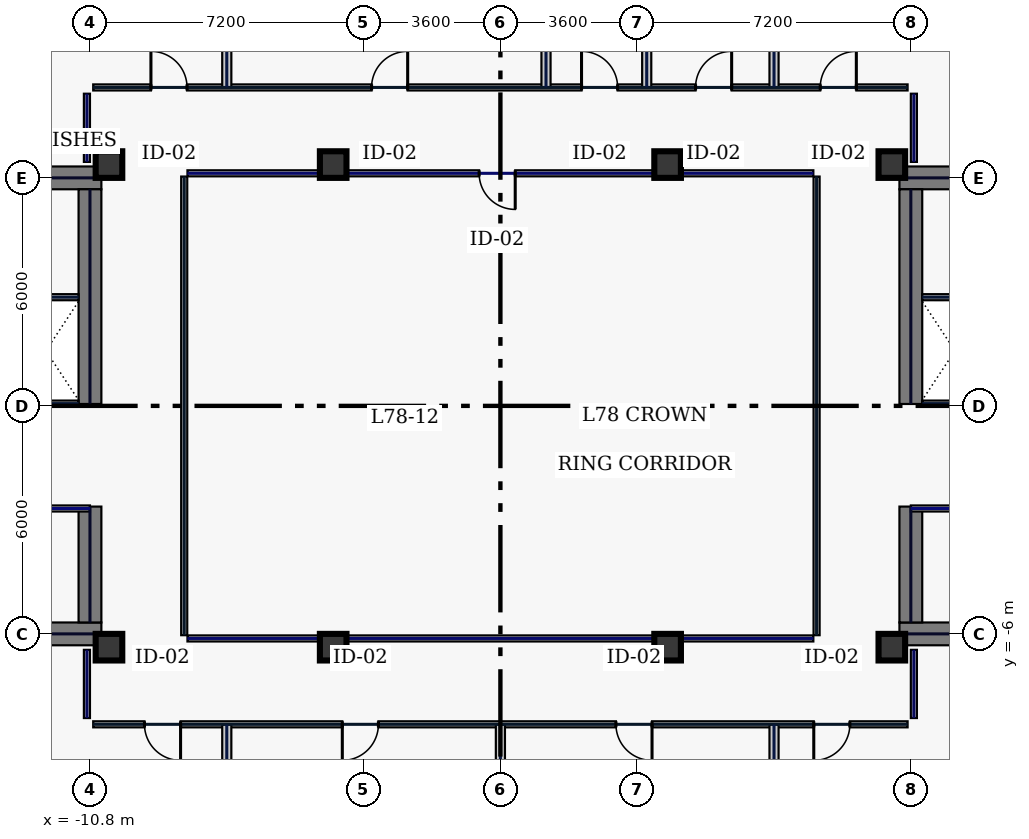
"""IFC4 building model, lengths in metres.
Left out: names, types, materials, properties, quantities, classifications, styles, units other than length and angle.
Written with IfcOpenShell. Run it as: python <this file> out.ifc"""

import sys

from ifc_helpers import new_model, si_unit, direction, frame, frame_2d, origin, origin_2d, place, context, subcontext, project, spatial, rectangle, hollow_rectangle, extrude, element, fill, save


model = new_model("IFC4")
c1 = context("Model", 3, precision=1e-05, world=origin(), true_north=direction((0.0, 1.0)))
c2 = subcontext(c1, "Body", "Model", "MODEL_VIEW")
j1 = project(units=[si_unit("LENGTHUNIT", "METRE"), si_unit("PLANEANGLEUNIT", "RADIAN")], contexts=[c1])
p1 = place(None, origin())
s1 = spatial("IfcSite", under=j1, at=p1, CompositionType="ELEMENT")
p2 = place(p1, origin())
s2 = spatial("IfcBuilding", under=s1, at=p2, CompositionType="ELEMENT")
p3 = place(p2, frame((0.0, 0.0, 333.0)))
s3 = spatial("IfcBuildingStorey", under=s2, at=p3, CompositionType="ELEMENT", Elevation=333.0)
for number, where, z_axis, x_axis in (
    (1, (-22.0, 6.0, 0.0), (0.0, 0.0, 1.0), (1.0, 0.0, 0.0)),
    (2, (-22.0, -6.0, 0.0), (0.0, 0.0, 1.0), (1.0, 0.0, 0.0)),
):
    element("IfcWall", number, at=place(p3, frame(where, z_axis=z_axis, x_axis=x_axis)), inside=s3, PredefinedType="SHEAR", context=c2, shape_type="SweptSolid", body=[
        extrude(rectangle(XDim=11.5, YDim=0.6, at=frame_2d((5.75, 0.0))), origin(), (0.0, 0.0, 1.0), 6.5),
    ])
p4 = place(p3, frame((-10.8, -5.7, 0.0), z_axis=(0.0, 0.0, 1.0), x_axis=(0.0, 1.0, 0.0)))
e3 = element("IfcWall", 3, at=p4, inside=s3, PredefinedType="SHEAR", context=c2, shape_type="SweptSolid", body=[
    extrude(rectangle(XDim=3.05, YDim=0.6, at=frame_2d((1.525, 0.0))), origin(), (0.0, 0.0, 1.0), 6.5),
])
p5 = place(p3, frame((-10.8, 0.05, 0.0), z_axis=(0.0, 0.0, 1.0), x_axis=(0.0, 1.0, 0.0)))
e4 = element("IfcWall", 4, at=p5, inside=s3, PredefinedType="SHEAR", context=c2, shape_type="SweptSolid", body=[
    extrude(rectangle(XDim=5.65, YDim=0.6, at=frame_2d((2.825, 0.0))), origin(), (0.0, 0.0, 1.0), 6.5),
])
for number, where, z_axis, x_axis in (
    (5, (10.5, 6.0, 0.0), (0.0, 0.0, 1.0), (1.0, 0.0, 0.0)),
    (6, (10.5, -6.0, 0.0), (0.0, 0.0, 1.0), (1.0, 0.0, 0.0)),
):
    element("IfcWall", number, at=place(p3, frame(where, z_axis=z_axis, x_axis=x_axis)), inside=s3, PredefinedType="SHEAR", context=c2, shape_type="SweptSolid", body=[
        extrude(rectangle(XDim=11.5, YDim=0.6, at=frame_2d((5.75, 0.0))), origin(), (0.0, 0.0, 1.0), 6.5),
    ])
p6 = place(p3, frame((10.8, -5.7, 0.0), z_axis=(0.0, 0.0, 1.0), x_axis=(0.0, 1.0, 0.0)))
e7 = element("IfcWall", 7, at=p6, inside=s3, PredefinedType="SHEAR", context=c2, shape_type="SweptSolid", body=[
    extrude(rectangle(XDim=3.05, YDim=0.6, at=frame_2d((1.525, 0.0))), origin(), (0.0, 0.0, 1.0), 6.5),
])
p7 = place(p3, frame((10.8, 0.05, 0.0), z_axis=(0.0, 0.0, 1.0), x_axis=(0.0, 1.0, 0.0)))
e8 = element("IfcWall", 8, at=p7, inside=s3, PredefinedType="SHEAR", context=c2, shape_type="SweptSolid", body=[
    extrude(rectangle(XDim=5.65, YDim=0.6, at=frame_2d((2.825, 0.0))), origin(), (0.0, 0.0, 1.0), 6.5),
])
for number, where, z_axis, x_axis in (
    (9, (-10.3, -6.35, 0.0), (0.0, 0.0, 1.0), (1.0, 0.0, 0.0)),
    (10, (-10.3, 6.35, 0.0), (0.0, 0.0, 1.0), (1.0, 0.0, 0.0)),
    (11, (10.3, -6.35, 0.0), (0.0, 0.0, 1.0), (1.0, 0.0, 0.0)),
    (12, (10.3, 6.35, 0.0), (0.0, 0.0, 1.0), (1.0, 0.0, 0.0)),
    (13, (-4.4, -6.35, 0.0), (0.0, 0.0, 1.0), (1.0, 0.0, 0.0)),
    (14, (4.4, -6.35, 0.0), (0.0, 0.0, 1.0), (1.0, 0.0, 0.0)),
    (15, (-4.4, 6.35, 0.0), (0.0, 0.0, 1.0), (1.0, 0.0, 0.0)),
    (16, (4.4, 6.35, 0.0), (0.0, 0.0, 1.0), (1.0, 0.0, 0.0)),
):
    element("IfcColumn", number, at=place(p3, frame(where, z_axis=z_axis, x_axis=x_axis)), inside=s3, PredefinedType="COLUMN", context=c2, shape_type="SweptSolid", body=[
        extrude(hollow_rectangle(XDim=0.7, YDim=0.7, WallThickness=0.032, at=origin_2d()), origin(), (0.0, 0.0, 1.0), 6.5),
    ])
for number, where, z_axis, x_axis in (
    (17, (-12.82, 0.06, 0.0), (0.0, 0.0, 1.0), (1.0, 0.0, 0.0)),
    (18, (-12.82, 2.86, 0.0), (0.0, 0.0, 1.0), (1.0, 0.0, 0.0)),
    (19, (11.1, 0.06, 0.0), (0.0, 0.0, 1.0), (1.0, 0.0, 0.0)),
    (20, (11.1, 2.86, 0.0), (0.0, 0.0, 1.0), (1.0, 0.0, 0.0)),
):
    element("IfcWall", number, at=place(p3, frame(where, z_axis=z_axis, x_axis=x_axis)), inside=s3, PredefinedType="PARTITIONING", context=c2, shape_type="SweptSolid", body=[
        extrude(rectangle(XDim=1.72, YDim=0.16, at=frame_2d((0.86, 0.0))), origin(), (0.0, 0.0, 1.0), 6.5),
    ])
for number, where, z_axis, x_axis in (
    (21, (-14.535, -2.7, 0.0), (0.0, 0.0, 1.0), (1.0, 0.0, 0.0)),
    (22, (10.8, -2.7, 0.0), (0.0, 0.0, 1.0), (1.0, 0.0, 0.0)),
):
    element("IfcWall", number, at=place(p3, frame(where, z_axis=z_axis, x_axis=x_axis)), inside=s3, PredefinedType="PARTITIONING", context=c2, shape_type="SweptSolid", body=[
        extrude(rectangle(XDim=3.735, YDim=0.16, at=frame_2d((1.867, 0.0))), origin(), (0.0, 0.0, 1.0), 6.5),
    ])
for number, where, z_axis, x_axis in (
    (23, (-10.88, -8.215, 0.0), (0.0, 0.0, 1.0), (0.0, 1.0, 0.0)),
    (24, (-10.88, 6.42, 0.0), (0.0, 0.0, 1.0), (0.0, 1.0, 0.0)),
):
    element("IfcWall", number, at=place(p3, frame(where, z_axis=z_axis, x_axis=x_axis)), inside=s3, PredefinedType="PARTITIONING", context=c2, shape_type="SweptSolid", body=[
        extrude(rectangle(XDim=1.795, YDim=0.16, at=frame_2d((0.897, 0.0))), origin(), (0.0, 0.0, 1.0), 4.895),
    ])
p8 = place(p3, frame((-10.715, 8.38, 0.0), z_axis=(0.0, 0.0, 1.0), x_axis=(1.0, 0.0, 0.0)))
e25 = element("IfcWall", 25, at=p8, inside=s3, PredefinedType="PARTITIONING", context=c2, shape_type="SweptSolid", body=[
    extrude(rectangle(XDim=21.43, YDim=0.16, at=frame_2d((10.715, 0.0))), origin(), (0.0, 0.0, 1.0), 6.5),
])
p9 = place(p8, frame((7.325, 0.0, 0.0)))
e26 = element("IfcOpeningElement", 26, at=p9, cuts=e25, PredefinedType="OPENING", context=c2, shape_type="SweptSolid", body=[
    extrude(rectangle(XDim=0.95, YDim=2.2, at=frame_2d((0.475, 1.1))), frame((0.0, 0.09, 0.0), z_axis=(0.0, -1.0, 0.0), x_axis=(1.0, 0.0, 0.0)), (0.0, 0.0, 1.0), 0.18),
])
p10 = place(p8, frame((12.85, 0.0, 0.0)))
e27 = element("IfcOpeningElement", 27, at=p10, cuts=e25, PredefinedType="OPENING", context=c2, shape_type="SweptSolid", body=[
    extrude(rectangle(XDim=0.95, YDim=2.2, at=frame_2d((0.475, 1.1))), frame((0.0, 0.09, 0.0), z_axis=(0.0, -1.0, 0.0), x_axis=(1.0, 0.0, 0.0)), (0.0, 0.0, 1.0), 0.18),
])
p11 = place(p8, frame((15.85, 0.0, 0.0)))
e28 = element("IfcOpeningElement", 28, at=p11, cuts=e25, PredefinedType="OPENING", context=c2, shape_type="SweptSolid", body=[
    extrude(rectangle(XDim=0.95, YDim=2.2, at=frame_2d((0.475, 1.1))), frame((0.0, 0.09, 0.0), z_axis=(0.0, -1.0, 0.0), x_axis=(1.0, 0.0, 0.0)), (0.0, 0.0, 1.0), 0.18),
])
p12 = place(p8, frame((1.519, 0.0, 0.0)))
e29 = element("IfcOpeningElement", 29, at=p12, cuts=e25, PredefinedType="OPENING", context=c2, shape_type="SweptSolid", body=[
    extrude(rectangle(XDim=0.95, YDim=2.2, at=frame_2d((0.475, 1.1))), frame((0.0, 0.09, 0.0), z_axis=(0.0, -1.0, 0.0), x_axis=(1.0, 0.0, 0.0)), (0.0, 0.0, 1.0), 0.18),
])
p13 = place(p8, frame((19.131, 0.0, 0.0)))
e30 = element("IfcOpeningElement", 30, at=p13, cuts=e25, PredefinedType="OPENING", context=c2, shape_type="SweptSolid", body=[
    extrude(rectangle(XDim=0.95, YDim=2.2, at=frame_2d((0.475, 1.1))), frame((0.0, 0.09, 0.0), z_axis=(0.0, -1.0, 0.0), x_axis=(1.0, 0.0, 0.0)), (0.0, 0.0, 1.0), 0.18),
])
for number, where, z_axis, x_axis in (
    (31, (10.88, 8.215, 0.0), (0.0, 0.0, 1.0), (0.0, -1.0, 0.0)),
    (32, (10.88, -6.42, 0.0), (0.0, 0.0, 1.0), (0.0, -1.0, 0.0)),
):
    element("IfcWall", number, at=place(p3, frame(where, z_axis=z_axis, x_axis=x_axis)), inside=s3, PredefinedType="PARTITIONING", context=c2, shape_type="SweptSolid", body=[
        extrude(rectangle(XDim=1.795, YDim=0.16, at=frame_2d((0.897, 0.0))), origin(), (0.0, 0.0, 1.0), 4.895),
    ])
p14 = place(p3, frame((10.715, -8.38, 0.0), z_axis=(0.0, 0.0, 1.0), x_axis=(-1.0, 0.0, 0.0)))
e33 = element("IfcWall", 33, at=p14, inside=s3, PredefinedType="PARTITIONING", context=c2, shape_type="SweptSolid", body=[
    extrude(rectangle(XDim=21.43, YDim=0.16, at=frame_2d((10.715, 0.0))), origin(), (0.0, 0.0, 1.0), 6.5),
])
p15 = place(p14, frame((13.925, 0.0, 0.0)))
e34 = element("IfcOpeningElement", 34, at=p15, cuts=e33, PredefinedType="OPENING", context=c2, shape_type="SweptSolid", body=[
    extrude(rectangle(XDim=0.95, YDim=2.2, at=frame_2d((0.475, 1.1))), frame((0.0, 0.09, 0.0), z_axis=(0.0, -1.0, 0.0), x_axis=(1.0, 0.0, 0.0)), (0.0, 0.0, 1.0), 0.18),
])
p16 = place(p14, frame((6.725, 0.0, 0.0)))
e35 = element("IfcOpeningElement", 35, at=p16, cuts=e33, PredefinedType="OPENING", context=c2, shape_type="SweptSolid", body=[
    extrude(rectangle(XDim=0.95, YDim=2.2, at=frame_2d((0.475, 1.1))), frame((0.0, 0.09, 0.0), z_axis=(0.0, -1.0, 0.0), x_axis=(1.0, 0.0, 0.0)), (0.0, 0.0, 1.0), 0.18),
])
p17 = place(p14, frame((19.131, 0.0, 0.0)))
e36 = element("IfcOpeningElement", 36, at=p17, cuts=e33, PredefinedType="OPENING", context=c2, shape_type="SweptSolid", body=[
    extrude(rectangle(XDim=0.95, YDim=2.2, at=frame_2d((0.475, 1.1))), frame((0.0, 0.09, 0.0), z_axis=(0.0, -1.0, 0.0), x_axis=(1.0, 0.0, 0.0)), (0.0, 0.0, 1.0), 0.18),
])
p18 = place(p14, frame((1.519, 0.0, 0.0)))
e37 = element("IfcOpeningElement", 37, at=p18, cuts=e33, PredefinedType="OPENING", context=c2, shape_type="SweptSolid", body=[
    extrude(rectangle(XDim=0.95, YDim=2.2, at=frame_2d((0.475, 1.1))), frame((0.0, 0.09, 0.0), z_axis=(0.0, -1.0, 0.0), x_axis=(1.0, 0.0, 0.0)), (0.0, 0.0, 1.0), 0.18),
])
p19 = place(p3, frame((8.32, -6.035, 0.0), z_axis=(0.0, 0.0, 1.0), x_axis=(0.0, 1.0, 0.0)))
e38 = element("IfcWall", 38, at=p19, inside=s3, PredefinedType="PARTITIONING", context=c2, shape_type="SweptSolid", body=[
    extrude(rectangle(XDim=12.07, YDim=0.16, at=frame_2d((6.035, 0.0))), origin(), (0.0, 0.0, 1.0), 6.5),
])
p20 = place(p3, frame((8.235, 6.12, 0.0), z_axis=(0.0, 0.0, 1.0), x_axis=(-1.0, 0.0, 0.0)))
e39 = element("IfcWall", 39, at=p20, inside=s3, PredefinedType="PARTITIONING", context=c2, shape_type="SweptSolid", body=[
    extrude(rectangle(XDim=16.47, YDim=0.16, at=frame_2d((8.235, 0.0))), origin(), (0.0, 0.0, 1.0), 5.795),
])
p21 = place(p20, frame((7.845, 0.0, 0.0)))
e40 = element("IfcOpeningElement", 40, at=p21, cuts=e39, PredefinedType="OPENING", context=c2, shape_type="SweptSolid", body=[
    extrude(rectangle(XDim=0.95, YDim=2.2, at=frame_2d((0.475, 1.1))), frame((0.0, 0.09, 0.0), z_axis=(0.0, -1.0, 0.0), x_axis=(1.0, 0.0, 0.0)), (0.0, 0.0, 1.0), 0.18),
])
p22 = place(p3, frame((-8.32, 6.035, 0.0), z_axis=(0.0, 0.0, 1.0), x_axis=(0.0, -1.0, 0.0)))
e41 = element("IfcWall", 41, at=p22, inside=s3, PredefinedType="PARTITIONING", context=c2, shape_type="SweptSolid", body=[
    extrude(rectangle(XDim=12.07, YDim=0.16, at=frame_2d((6.035, 0.0))), origin(), (0.0, 0.0, 1.0), 6.5),
])
p23 = place(p3, frame((-8.235, -6.12, 0.0), z_axis=(0.0, 0.0, 1.0), x_axis=(1.0, 0.0, 0.0)))
e42 = element("IfcWall", 42, at=p23, inside=s3, PredefinedType="PARTITIONING", context=c2, shape_type="SweptSolid", body=[
    extrude(rectangle(XDim=16.47, YDim=0.16, at=frame_2d((8.235, 0.0))), origin(), (0.0, 0.0, 1.0), 5.795),
])
for number, where, z_axis, x_axis in (
    (43, (-7.2, -18.24, 0.0), (0.0, 0.0, 1.0), (0.0, 1.0, 0.0)),
    (44, (7.2, -18.24, 0.0), (0.0, 0.0, 1.0), (0.0, 1.0, 0.0)),
    (45, (-7.2, 8.385, 0.0), (0.0, 0.0, 1.0), (0.0, 1.0, 0.0)),
    (46, (7.2, 8.385, 0.0), (0.0, 0.0, 1.0), (0.0, 1.0, 0.0)),
    (47, (0.0, -18.24, 0.0), (0.0, 0.0, 1.0), (0.0, 1.0, 0.0)),
    (48, (1.2, 8.385, 0.0), (0.0, 0.0, 1.0), (0.0, 1.0, 0.0)),
    (49, (3.85, 8.385, 0.0), (0.0, 0.0, 1.0), (0.0, 1.0, 0.0)),
):
    element("IfcWall", number, at=place(p3, frame(where, z_axis=z_axis, x_axis=x_axis)), inside=s3, PredefinedType="PARTITIONING", context=c2, shape_type="SweptSolid", body=[
        extrude(rectangle(XDim=9.855, YDim=0.24, at=frame_2d((4.927, 0.0))), origin(), (0.0, 0.0, 1.0), 6.5),
    ])
p24 = place(p21, origin())
e50 = element("IfcDoor", 50, at=p24, inside=s3, OperationType="SINGLE_SWING_LEFT", PredefinedType="DOOR", context=c2, shape_type="SweptSolid", body=[
    extrude(rectangle(XDim=0.95, YDim=2.2, at=frame_2d((0.475, 1.1))), frame((0.0, 0.025, 0.0), z_axis=(0.0, -1.0, 0.0), x_axis=(1.0, 0.0, 0.0)), (0.0, 0.0, 1.0), 0.05),
])
fill(e40, e50)
p25 = place(p15, origin())
e51 = element("IfcDoor", 51, at=p25, inside=s3, OperationType="SINGLE_SWING_RIGHT", PredefinedType="DOOR", context=c2, shape_type="SweptSolid", body=[
    extrude(rectangle(XDim=0.95, YDim=2.2, at=frame_2d((0.475, 1.1))), frame((0.0, 0.025, 0.0), z_axis=(0.0, -1.0, 0.0), x_axis=(1.0, 0.0, 0.0)), (0.0, 0.0, 1.0), 0.05),
])
fill(e34, e51)
p26 = place(p16, origin())
e52 = element("IfcDoor", 52, at=p26, inside=s3, OperationType="SINGLE_SWING_LEFT", PredefinedType="DOOR", context=c2, shape_type="SweptSolid", body=[
    extrude(rectangle(XDim=0.95, YDim=2.2, at=frame_2d((0.475, 1.1))), frame((0.0, 0.025, 0.0), z_axis=(0.0, -1.0, 0.0), x_axis=(1.0, 0.0, 0.0)), (0.0, 0.0, 1.0), 0.05),
])
fill(e35, e52)
p27 = place(p9, origin())
e53 = element("IfcDoor", 53, at=p27, inside=s3, OperationType="SINGLE_SWING_RIGHT", PredefinedType="DOOR", context=c2, shape_type="SweptSolid", body=[
    extrude(rectangle(XDim=0.95, YDim=2.2, at=frame_2d((0.475, 1.1))), frame((0.0, 0.025, 0.0), z_axis=(0.0, -1.0, 0.0), x_axis=(1.0, 0.0, 0.0)), (0.0, 0.0, 1.0), 0.05),
])
fill(e26, e53)
p28 = place(p10, origin())
e54 = element("IfcDoor", 54, at=p28, inside=s3, OperationType="SINGLE_SWING_LEFT", PredefinedType="DOOR", context=c2, shape_type="SweptSolid", body=[
    extrude(rectangle(XDim=0.95, YDim=2.2, at=frame_2d((0.475, 1.1))), frame((0.0, 0.025, 0.0), z_axis=(0.0, -1.0, 0.0), x_axis=(1.0, 0.0, 0.0)), (0.0, 0.0, 1.0), 0.05),
])
fill(e27, e54)
p29 = place(p11, origin())
e55 = element("IfcDoor", 55, at=p29, inside=s3, OperationType="SINGLE_SWING_RIGHT", PredefinedType="DOOR", context=c2, shape_type="SweptSolid", body=[
    extrude(rectangle(XDim=0.95, YDim=2.2, at=frame_2d((0.475, 1.1))), frame((0.0, 0.025, 0.0), z_axis=(0.0, -1.0, 0.0), x_axis=(1.0, 0.0, 0.0)), (0.0, 0.0, 1.0), 0.05),
])
fill(e28, e55)
p30 = place(p17, origin())
e56 = element("IfcDoor", 56, at=p30, inside=s3, OperationType="SINGLE_SWING_LEFT", PredefinedType="DOOR", context=c2, shape_type="SweptSolid", body=[
    extrude(rectangle(XDim=0.95, YDim=2.2, at=frame_2d((0.475, 1.1))), frame((0.0, 0.025, 0.0), z_axis=(0.0, -1.0, 0.0), x_axis=(1.0, 0.0, 0.0)), (0.0, 0.0, 1.0), 0.05),
])
fill(e36, e56)
p31 = place(p18, origin())
e57 = element("IfcDoor", 57, at=p31, inside=s3, OperationType="SINGLE_SWING_RIGHT", PredefinedType="DOOR", context=c2, shape_type="SweptSolid", body=[
    extrude(rectangle(XDim=0.95, YDim=2.2, at=frame_2d((0.475, 1.1))), frame((0.0, 0.025, 0.0), z_axis=(0.0, -1.0, 0.0), x_axis=(1.0, 0.0, 0.0)), (0.0, 0.0, 1.0), 0.05),
])
fill(e37, e57)
p32 = place(p12, origin())
e58 = element("IfcDoor", 58, at=p32, inside=s3, OperationType="SINGLE_SWING_LEFT", PredefinedType="DOOR", context=c2, shape_type="SweptSolid", body=[
    extrude(rectangle(XDim=0.95, YDim=2.2, at=frame_2d((0.475, 1.1))), frame((0.0, 0.025, 0.0), z_axis=(0.0, -1.0, 0.0), x_axis=(1.0, 0.0, 0.0)), (0.0, 0.0, 1.0), 0.05),
])
fill(e29, e58)
p33 = place(p13, origin())
e59 = element("IfcDoor", 59, at=p33, inside=s3, OperationType="SINGLE_SWING_RIGHT", PredefinedType="DOOR", context=c2, shape_type="SweptSolid", body=[
    extrude(rectangle(XDim=0.95, YDim=2.2, at=frame_2d((0.475, 1.1))), frame((0.0, 0.025, 0.0), z_axis=(0.0, -1.0, 0.0), x_axis=(1.0, 0.0, 0.0)), (0.0, 0.0, 1.0), 0.05),
])
fill(e30, e59)
save(model, sys.argv[1])
